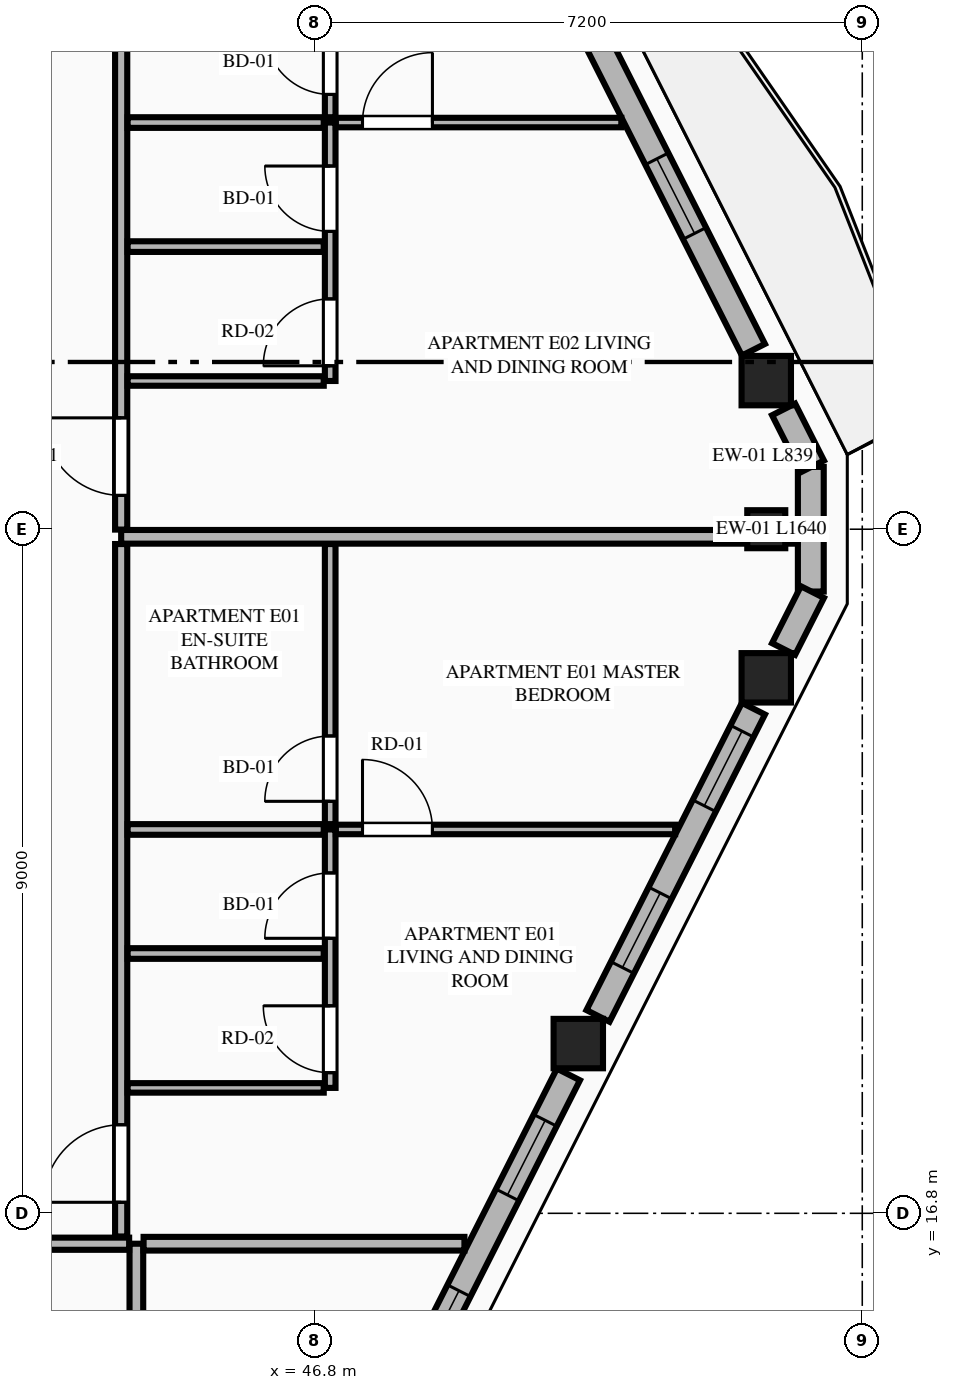
"""IFC4 building model, lengths in metres.
Left out: names, types, materials, properties, quantities, classifications, styles, units other than length and angle.
Written with IfcOpenShell. Run it as: python <this file> out.ifc"""

import sys

from ifc_helpers import new_model, si_unit, direction, frame, frame_2d, origin, origin_2d, place, context, subcontext, project, spatial, rectangle, extrude, element, fill, save


model = new_model("IFC4")
c1 = context("Model", 3, precision=1e-05, world=origin(), true_north=direction((0.0, 1.0)))
c2 = subcontext(c1, "Body", "Model", "MODEL_VIEW")
j1 = project(units=[si_unit("LENGTHUNIT", "METRE"), si_unit("PLANEANGLEUNIT", "RADIAN")], contexts=[c1])
p1 = place(None, origin())
s1 = spatial("IfcSite", under=j1, at=p1, CompositionType="ELEMENT")
p2 = place(p1, origin())
s2 = spatial("IfcBuilding", under=s1, at=p2, CompositionType="ELEMENT")
p3 = place(p2, frame((0.0, 0.0, 287.5)))
s3 = spatial("IfcBuildingStorey", under=s2, at=p3, CompositionType="ELEMENT", Elevation=287.5)
for number, where, z_axis, x_axis in (
    (1, (50.264, 19.033, 0.0), (0.0, 0.0, 1.0), (1.0, 0.0, 0.0)),
    (2, (52.737, 23.845, 0.0), (0.0, 0.0, 1.0), (1.0, 0.0, 0.0)),
    (3, (52.737, 27.755, 0.0), (0.0, 0.0, 1.0), (1.0, 0.0, 0.0)),
):
    element("IfcColumn", number, at=place(p3, frame(where, z_axis=z_axis, x_axis=x_axis)), inside=s3, PredefinedType="COLUMN", context=c2, shape_type="SweptSolid", body=[
        extrude(rectangle(XDim=0.65, YDim=0.65, at=origin_2d()), origin(), (0.0, 0.0, 1.0), 4.0),
    ])
p4 = place(p3, frame((52.737, 25.8, 0.0), z_axis=(0.0, 0.0, 1.0), x_axis=(0.0, 1.0, 0.0)))
e4 = element("IfcColumn", 4, at=p4, inside=s3, PredefinedType="PILASTER", context=c2, shape_type="SweptSolid", body=[
    extrude(rectangle(XDim=0.5, YDim=0.35, at=origin_2d()), origin(), (0.0, 0.0, 1.0), 4.0),
])
p5 = place(p3, frame((53.323, 24.98, 0.0), z_axis=(0.0, 0.0, 1.0), x_axis=(0.0, 1.0, 0.0)))
e5 = element("IfcWall", 5, at=p5, inside=s3, PredefinedType="STANDARD", context=c2, shape_type="SweptSolid", body=[
    extrude(rectangle(XDim=1.64, YDim=0.34, at=frame_2d((0.82, 0.0))), origin(), (0.0, 0.0, 1.0), 3.8),
])
p6 = place(p3, frame((48.002, 14.413, 0.0), z_axis=(0.0, 0.0, 1.0), x_axis=(0.451468341582, 0.892287137949, 0.0)))
e6 = element("IfcWall", 6, at=p6, inside=s3, PredefinedType="STANDARD", context=c2, shape_type="SweptSolid", body=[
    extrude(rectangle(XDim=4.723, YDim=0.34, at=frame_2d((2.361, 0.0))), origin(), (0.0, 0.0, 1.0), 2.99),
])
p7 = place(p6, frame((0.434, 0.0, 0.75)))
e7 = element("IfcOpeningElement", 7, at=p7, cuts=e6, PredefinedType="OPENING", context=c2, shape_type="SweptSolid", body=[
    extrude(rectangle(XDim=1.1, YDim=2.0, at=frame_2d((0.55, 1.0))), frame((0.0, 0.18, 0.0), z_axis=(0.0, -1.0, 0.0), x_axis=(1.0, 0.0, 0.0)), (0.0, 0.0, 1.0), 0.36),
])
p8 = place(p6, frame((2.946, 0.0, 0.75)))
e8 = element("IfcOpeningElement", 8, at=p8, cuts=e6, PredefinedType="OPENING", context=c2, shape_type="SweptSolid", body=[
    extrude(rectangle(XDim=1.1, YDim=2.0, at=frame_2d((0.55, 1.0))), frame((0.0, 0.18, 0.0), z_axis=(0.0, -1.0, 0.0), x_axis=(1.0, 0.0, 0.0)), (0.0, 0.0, 1.0), 0.36),
])
p9 = place(p3, frame((50.523, 19.397, 0.0), z_axis=(0.0, 0.0, 1.0), x_axis=(0.45147697324, 0.892282770558, 0.0)))
e9 = element("IfcWall", 9, at=p9, inside=s3, PredefinedType="STANDARD", context=c2, shape_type="SweptSolid", body=[
    extrude(rectangle(XDim=4.53, YDim=0.34, at=frame_2d((2.265, 0.0))), origin(), (0.0, 0.0, 1.0), 2.99),
])
p10 = place(p9, frame((0.713, 0.0, 0.75)))
e10 = element("IfcOpeningElement", 10, at=p10, cuts=e9, PredefinedType="OPENING", context=c2, shape_type="SweptSolid", body=[
    extrude(rectangle(XDim=1.1, YDim=2.0, at=frame_2d((0.55, 1.0))), frame((0.0, 0.18, 0.0), z_axis=(0.0, -1.0, 0.0), x_axis=(1.0, 0.0, 0.0)), (0.0, 0.0, 1.0), 0.36),
])
p11 = place(p9, frame((3.098, 0.0, 0.75)))
e11 = element("IfcOpeningElement", 11, at=p11, cuts=e9, PredefinedType="OPENING", context=c2, shape_type="SweptSolid", body=[
    extrude(rectangle(XDim=1.1, YDim=2.0, at=frame_2d((0.55, 1.0))), frame((0.0, 0.18, 0.0), z_axis=(0.0, -1.0, 0.0), x_axis=(1.0, 0.0, 0.0)), (0.0, 0.0, 1.0), 0.36),
])
p12 = place(p3, frame((52.965, 24.224, 0.0), z_axis=(0.0, 0.0, 1.0), x_axis=(0.4515140893, 0.892263989615, 0.0)))
e12 = element("IfcWall", 12, at=p12, inside=s3, PredefinedType="STANDARD", context=c2, shape_type="SweptSolid", body=[
    extrude(rectangle(XDim=0.839, YDim=0.34, at=frame_2d((0.419, 0.0))), origin(), (0.0, 0.0, 1.0), 3.8),
])
p13 = place(p3, frame((53.344, 26.627, 0.0), z_axis=(0.0, 0.0, 1.0), x_axis=(-0.45139691133, 0.892323275748, 0.0)))
e13 = element("IfcWall", 13, at=p13, inside=s3, PredefinedType="STANDARD", context=c2, shape_type="SweptSolid", body=[
    extrude(rectangle(XDim=0.839, YDim=0.34, at=frame_2d((0.42, 0.0))), origin(), (0.0, 0.0, 1.0), 3.8),
])
p14 = place(p3, frame((52.568, 28.161, 0.0), z_axis=(0.0, 0.0, 1.0), x_axis=(-0.45147697324, 0.892282770558, 0.0)))
e14 = element("IfcWall", 14, at=p14, inside=s3, PredefinedType="STANDARD", context=c2, shape_type="SweptSolid", body=[
    extrude(rectangle(XDim=4.53, YDim=0.34, at=frame_2d((2.265, 0.0))), origin(), (0.0, 0.0, 1.0), 2.99),
])
p15 = place(p14, frame((1.715, 0.0, 0.75)))
e15 = element("IfcOpeningElement", 15, at=p15, cuts=e14, PredefinedType="OPENING", context=c2, shape_type="SweptSolid", body=[
    extrude(rectangle(XDim=1.1, YDim=2.0, at=frame_2d((0.55, 1.0))), frame((0.0, 0.18, 0.0), z_axis=(0.0, -1.0, 0.0), x_axis=(1.0, 0.0, 0.0)), (0.0, 0.0, 1.0), 0.36),
])
p16 = place(p3, frame((44.45, 8.119, 0.0), z_axis=(0.0, 0.0, 1.0), x_axis=(0.0, 1.0, 0.0)))
e16 = element("IfcWall", 16, at=p16, inside=s3, PredefinedType="PARTITIONING", context=c2, shape_type="SweptSolid", body=[
    extrude(rectangle(XDim=8.281, YDim=0.18, at=frame_2d((4.141, 0.0))), origin(), (0.0, 0.0, 1.0), 3.8),
])
p17 = place(p3, frame((20.445, 16.4, 0.0), z_axis=(0.0, 0.0, 1.0), x_axis=(1.0, 0.0, 0.0)))
e17 = element("IfcWall", 17, at=p17, inside=s3, PredefinedType="PARTITIONING", context=c2, shape_type="SweptSolid", body=[
    extrude(rectangle(XDim=23.91, YDim=0.16, at=frame_2d((11.955, 0.0))), origin(), (0.0, 0.0, 1.0), 3.8),
])
p18 = place(p17, frame((21.705, 0.0, 0.0)))
e18 = element("IfcOpeningElement", 18, at=p18, cuts=e17, PredefinedType="OPENING", context=c2, shape_type="SweptSolid", body=[
    extrude(rectangle(XDim=1.02, YDim=2.25, at=frame_2d((0.51, 1.125))), frame((0.0, 0.09, 0.0), z_axis=(0.0, -1.0, 0.0), x_axis=(1.0, 0.0, 0.0)), (0.0, 0.0, 1.0), 0.18),
])
p19 = place(p3, frame((44.545, 16.4, 0.0), z_axis=(0.0, 0.0, 1.0), x_axis=(1.0, 0.0, 0.0)))
e19 = element("IfcWall", 19, at=p19, inside=s3, PredefinedType="PARTITIONING", context=c2, shape_type="SweptSolid", body=[
    extrude(rectangle(XDim=4.221, YDim=0.18, at=frame_2d((2.111, 0.0))), origin(), (0.0, 0.0, 1.0), 3.8),
])
p20 = place(p3, frame((44.25, 16.495, 0.0), z_axis=(0.0, 0.0, 1.0), x_axis=(0.0, 1.0, 0.0)))
e20 = element("IfcWall", 20, at=p20, inside=s3, PredefinedType="PARTITIONING", context=c2, shape_type="SweptSolid", body=[
    extrude(rectangle(XDim=9.11, YDim=0.16, at=frame_2d((4.555, 0.0))), origin(), (0.0, 0.0, 1.0), 3.487),
])
p21 = place(p20, frame((0.45, 0.0, 0.0)))
e21 = element("IfcOpeningElement", 21, at=p21, cuts=e20, PredefinedType="OPENING", context=c2, shape_type="SweptSolid", body=[
    extrude(rectangle(XDim=1.02, YDim=2.25, at=frame_2d((0.51, 1.125))), frame((0.0, 0.09, 0.0), z_axis=(0.0, -1.0, 0.0), x_axis=(1.0, 0.0, 0.0)), (0.0, 0.0, 1.0), 0.18),
])
p22 = place(p3, frame((44.335, 18.45, 0.0), z_axis=(0.0, 0.0, 1.0), x_axis=(1.0, 0.0, 0.0)))
e22 = element("IfcWall", 22, at=p22, inside=s3, PredefinedType="PARTITIONING", context=c2, shape_type="SweptSolid", body=[
    extrude(rectangle(XDim=2.58, YDim=0.125, at=frame_2d((1.29, 0.0))), origin(), (0.0, 0.0, 1.0), 3.8),
])
p23 = place(p3, frame((47.0, 18.45, 0.0), z_axis=(0.0, 0.0, 1.0), x_axis=(0.0, 1.0, 0.0)))
e23 = element("IfcWall", 23, at=p23, inside=s3, PredefinedType="PLUMBINGWALL", context=c2, shape_type="SweptSolid", body=[
    extrude(rectangle(XDim=3.4, YDim=0.14, at=frame_2d((1.7, 0.0))), origin(), (0.0, 0.0, 1.0), 3.8),
])
p24 = place(p23, frame((0.2, 0.0, 0.0)))
e24 = element("IfcOpeningElement", 24, at=p24, cuts=e23, PredefinedType="OPENING", context=c2, shape_type="SweptSolid", body=[
    extrude(rectangle(XDim=0.88, YDim=2.15, at=frame_2d((0.44, 1.075))), frame((0.0, 0.08, 0.0), z_axis=(0.0, -1.0, 0.0), x_axis=(1.0, 0.0, 0.0)), (0.0, 0.0, 1.0), 0.16),
])
p25 = place(p23, frame((1.968, 0.0, 0.0)))
e25 = element("IfcOpeningElement", 25, at=p25, cuts=e23, PredefinedType="OPENING", context=c2, shape_type="SweptSolid", body=[
    extrude(rectangle(XDim=0.86, YDim=2.1, at=frame_2d((0.43, 1.05))), frame((0.0, 0.08, 0.0), z_axis=(0.0, -1.0, 0.0), x_axis=(1.0, 0.0, 0.0)), (0.0, 0.0, 1.0), 0.16),
])
p26 = place(p3, frame((47.0, 21.92, 0.0), z_axis=(0.0, 0.0, 1.0), x_axis=(0.0, 1.0, 0.0)))
e26 = element("IfcWall", 26, at=p26, inside=s3, PredefinedType="PLUMBINGWALL", context=c2, shape_type="SweptSolid", body=[
    extrude(rectangle(XDim=3.685, YDim=0.14, at=frame_2d((1.843, 0.0))), origin(), (0.0, 0.0, 1.0), 3.8),
])
p27 = place(p26, frame((0.3, 0.0, 0.0)))
e27 = element("IfcOpeningElement", 27, at=p27, cuts=e26, PredefinedType="OPENING", context=c2, shape_type="SweptSolid", body=[
    extrude(rectangle(XDim=0.86, YDim=2.1, at=frame_2d((0.43, 1.05))), frame((0.0, 0.08, 0.0), z_axis=(0.0, -1.0, 0.0), x_axis=(1.0, 0.0, 0.0)), (0.0, 0.0, 1.0), 0.16),
])
p28 = place(p3, frame((44.335, 21.85, 0.0), z_axis=(0.0, 0.0, 1.0), x_axis=(1.0, 0.0, 0.0)))
e28 = element("IfcWall", 28, at=p28, inside=s3, PredefinedType="PLUMBINGWALL", context=c2, shape_type="SweptSolid", body=[
    extrude(rectangle(XDim=2.58, YDim=0.14, at=frame_2d((1.29, 0.0))), origin(), (0.0, 0.0, 1.0), 3.8),
])
p29 = place(p3, frame((47.075, 21.85, 0.0), z_axis=(0.0, 0.0, 1.0), x_axis=(1.0, 0.0, 0.0)))
e29 = element("IfcWall", 29, at=p29, inside=s3, PredefinedType="PARTITIONING", context=c2, shape_type="SweptSolid", body=[
    extrude(rectangle(XDim=4.463, YDim=0.125, at=frame_2d((2.231, 0.0))), origin(), (0.0, 0.0, 1.0), 3.8),
])
p30 = place(p29, frame((0.35, 0.0, 0.0)))
e30 = element("IfcOpeningElement", 30, at=p30, cuts=e29, PredefinedType="OPENING", context=c2, shape_type="SweptSolid", body=[
    extrude(rectangle(XDim=0.92, YDim=2.15, at=frame_2d((0.46, 1.075))), frame((0.0, 0.073, 0.0), z_axis=(0.0, -1.0, 0.0), x_axis=(1.0, 0.0, 0.0)), (0.0, 0.0, 1.0), 0.145),
])
p31 = place(p3, frame((44.335, 20.218, 0.0), z_axis=(0.0, 0.0, 1.0), x_axis=(1.0, 0.0, 0.0)))
e31 = element("IfcWall", 31, at=p31, inside=s3, PredefinedType="PLUMBINGWALL", context=c2, shape_type="SweptSolid", body=[
    extrude(rectangle(XDim=2.58, YDim=0.14, at=frame_2d((1.29, 0.0))), origin(), (0.0, 0.0, 1.0), 3.8),
])
p32 = place(p3, frame((44.25, 25.7, 0.0), z_axis=(0.0, 0.0, 1.0), x_axis=(1.0, 0.0, 0.0)))
e32 = element("IfcWall", 32, at=p32, inside=s3, PredefinedType="PARTITIONING", context=c2, shape_type="SweptSolid", body=[
    extrude(rectangle(XDim=8.898, YDim=0.18, at=frame_2d((4.449, 0.0))), origin(), (0.0, 0.0, 1.0), 3.8),
])
p33 = place(p3, frame((44.25, 25.795, 0.0), z_axis=(0.0, 0.0, 1.0), x_axis=(0.0, 1.0, 0.0)))
e33 = element("IfcWall", 33, at=p33, inside=s3, PredefinedType="PARTITIONING", context=c2, shape_type="SweptSolid", body=[
    extrude(rectangle(XDim=9.11, YDim=0.16, at=frame_2d((4.555, 0.0))), origin(), (0.0, 0.0, 1.0), 3.487),
])
p34 = place(p33, frame((0.45, 0.0, 0.0)))
e34 = element("IfcOpeningElement", 34, at=p34, cuts=e33, PredefinedType="OPENING", context=c2, shape_type="SweptSolid", body=[
    extrude(rectangle(XDim=1.02, YDim=2.25, at=frame_2d((0.51, 1.125))), frame((0.0, 0.09, 0.0), z_axis=(0.0, -1.0, 0.0), x_axis=(1.0, 0.0, 0.0)), (0.0, 0.0, 1.0), 0.18),
])
p35 = place(p3, frame((44.335, 27.75, 0.0), z_axis=(0.0, 0.0, 1.0), x_axis=(1.0, 0.0, 0.0)))
e35 = element("IfcWall", 35, at=p35, inside=s3, PredefinedType="PARTITIONING", context=c2, shape_type="SweptSolid", body=[
    extrude(rectangle(XDim=2.58, YDim=0.125, at=frame_2d((1.29, 0.0))), origin(), (0.0, 0.0, 1.0), 3.257),
])
p36 = place(p3, frame((47.0, 27.75, 0.0), z_axis=(0.0, 0.0, 1.0), x_axis=(0.0, 1.0, 0.0)))
e36 = element("IfcWall", 36, at=p36, inside=s3, PredefinedType="PLUMBINGWALL", context=c2, shape_type="SweptSolid", body=[
    extrude(rectangle(XDim=3.4, YDim=0.14, at=frame_2d((1.7, 0.0))), origin(), (0.0, 0.0, 1.0), 3.8),
])
p37 = place(p36, frame((0.2, 0.0, 0.0)))
e37 = element("IfcOpeningElement", 37, at=p37, cuts=e36, PredefinedType="OPENING", context=c2, shape_type="SweptSolid", body=[
    extrude(rectangle(XDim=0.88, YDim=2.15, at=frame_2d((0.44, 1.075))), frame((0.0, 0.08, 0.0), z_axis=(0.0, -1.0, 0.0), x_axis=(1.0, 0.0, 0.0)), (0.0, 0.0, 1.0), 0.16),
])
p38 = place(p36, frame((1.968, 0.0, 0.0)))
e38 = element("IfcOpeningElement", 38, at=p38, cuts=e36, PredefinedType="OPENING", context=c2, shape_type="SweptSolid", body=[
    extrude(rectangle(XDim=0.86, YDim=2.1, at=frame_2d((0.43, 1.05))), frame((0.0, 0.08, 0.0), z_axis=(0.0, -1.0, 0.0), x_axis=(1.0, 0.0, 0.0)), (0.0, 0.0, 1.0), 0.16),
])
p39 = place(p3, frame((47.0, 31.22, 0.0), z_axis=(0.0, 0.0, 1.0), x_axis=(0.0, 1.0, 0.0)))
e39 = element("IfcWall", 39, at=p39, inside=s3, PredefinedType="PLUMBINGWALL", context=c2, shape_type="SweptSolid", body=[
    extrude(rectangle(XDim=3.685, YDim=0.14, at=frame_2d((1.843, 0.0))), origin(), (0.0, 0.0, 1.0), 3.8),
])
p40 = place(p39, frame((0.3, 0.0, 0.0)))
e40 = element("IfcOpeningElement", 40, at=p40, cuts=e39, PredefinedType="OPENING", context=c2, shape_type="SweptSolid", body=[
    extrude(rectangle(XDim=0.86, YDim=2.1, at=frame_2d((0.43, 1.05))), frame((0.0, 0.08, 0.0), z_axis=(0.0, -1.0, 0.0), x_axis=(1.0, 0.0, 0.0)), (0.0, 0.0, 1.0), 0.16),
])
p41 = place(p3, frame((44.335, 31.15, 0.0), z_axis=(0.0, 0.0, 1.0), x_axis=(1.0, 0.0, 0.0)))
e41 = element("IfcWall", 41, at=p41, inside=s3, PredefinedType="PLUMBINGWALL", context=c2, shape_type="SweptSolid", body=[
    extrude(rectangle(XDim=2.58, YDim=0.14, at=frame_2d((1.29, 0.0))), origin(), (0.0, 0.0, 1.0), 3.8),
])
p42 = place(p3, frame((47.075, 31.15, 0.0), z_axis=(0.0, 0.0, 1.0), x_axis=(1.0, 0.0, 0.0)))
e42 = element("IfcWall", 42, at=p42, inside=s3, PredefinedType="PARTITIONING", context=c2, shape_type="SweptSolid", body=[
    extrude(rectangle(XDim=3.755, YDim=0.125, at=frame_2d((1.877, 0.0))), origin(), (0.0, 0.0, 1.0), 3.8),
])
p43 = place(p42, frame((0.35, 0.0, 0.0)))
e43 = element("IfcOpeningElement", 43, at=p43, cuts=e42, PredefinedType="OPENING", context=c2, shape_type="SweptSolid", body=[
    extrude(rectangle(XDim=0.92, YDim=2.15, at=frame_2d((0.46, 1.075))), frame((0.0, 0.073, 0.0), z_axis=(0.0, -1.0, 0.0), x_axis=(1.0, 0.0, 0.0)), (0.0, 0.0, 1.0), 0.145),
])
p44 = place(p3, frame((44.335, 29.518, 0.0), z_axis=(0.0, 0.0, 1.0), x_axis=(1.0, 0.0, 0.0)))
e44 = element("IfcWall", 44, at=p44, inside=s3, PredefinedType="PLUMBINGWALL", context=c2, shape_type="SweptSolid", body=[
    extrude(rectangle(XDim=2.58, YDim=0.14, at=frame_2d((1.29, 0.0))), origin(), (0.0, 0.0, 1.0), 3.8),
])
p45 = place(p7, origin())
e45 = element("IfcWindow", 45, at=p45, inside=s3, PartitioningType="SINGLE_PANEL", PredefinedType="WINDOW", context=c2, shape_type="SweptSolid", body=[
    extrude(rectangle(XDim=1.1, YDim=2.0, at=frame_2d((0.55, 1.0))), frame((0.0, 0.03, 0.0), z_axis=(0.0, -1.0, 0.0), x_axis=(1.0, 0.0, 0.0)), (0.0, 0.0, 1.0), 0.06),
])
fill(e7, e45)
p46 = place(p10, origin())
e46 = element("IfcWindow", 46, at=p46, inside=s3, PartitioningType="SINGLE_PANEL", PredefinedType="WINDOW", context=c2, shape_type="SweptSolid", body=[
    extrude(rectangle(XDim=1.1, YDim=2.0, at=frame_2d((0.55, 1.0))), frame((0.0, 0.03, 0.0), z_axis=(0.0, -1.0, 0.0), x_axis=(1.0, 0.0, 0.0)), (0.0, 0.0, 1.0), 0.06),
])
fill(e10, e46)
p47 = place(p15, origin())
e47 = element("IfcWindow", 47, at=p47, inside=s3, PartitioningType="SINGLE_PANEL", PredefinedType="WINDOW", context=c2, shape_type="SweptSolid", body=[
    extrude(rectangle(XDim=1.1, YDim=2.0, at=frame_2d((0.55, 1.0))), frame((0.0, 0.03, 0.0), z_axis=(0.0, -1.0, 0.0), x_axis=(1.0, 0.0, 0.0)), (0.0, 0.0, 1.0), 0.06),
])
fill(e15, e47)
p48 = place(p24, origin())
e48 = element("IfcDoor", 48, at=p48, inside=s3, OperationType="SINGLE_SWING_RIGHT", PredefinedType="DOOR", context=c2, shape_type="SweptSolid", body=[
    extrude(rectangle(XDim=0.88, YDim=2.15, at=frame_2d((0.44, 1.075))), frame((0.0, 0.025, 0.0), z_axis=(0.0, -1.0, 0.0), x_axis=(1.0, 0.0, 0.0)), (0.0, 0.0, 1.0), 0.05),
])
fill(e24, e48)
p49 = place(p25, origin())
e49 = element("IfcDoor", 49, at=p49, inside=s3, OperationType="SINGLE_SWING_LEFT", PredefinedType="DOOR", context=c2, shape_type="SweptSolid", body=[
    extrude(rectangle(XDim=0.86, YDim=2.1, at=frame_2d((0.43, 1.05))), frame((0.0, 0.025, 0.0), z_axis=(0.0, -1.0, 0.0), x_axis=(1.0, 0.0, 0.0)), (0.0, 0.0, 1.0), 0.05),
])
fill(e25, e49)
p50 = place(p27, origin())
e50 = element("IfcDoor", 50, at=p50, inside=s3, OperationType="SINGLE_SWING_LEFT", PredefinedType="DOOR", context=c2, shape_type="SweptSolid", body=[
    extrude(rectangle(XDim=0.86, YDim=2.1, at=frame_2d((0.43, 1.05))), frame((0.0, 0.025, 0.0), z_axis=(0.0, -1.0, 0.0), x_axis=(1.0, 0.0, 0.0)), (0.0, 0.0, 1.0), 0.05),
])
fill(e27, e50)
p51 = place(p21, origin())
e51 = element("IfcDoor", 51, at=p51, inside=s3, OperationType="SINGLE_SWING_LEFT", PredefinedType="DOOR", context=c2, shape_type="SweptSolid", body=[
    extrude(rectangle(XDim=1.02, YDim=2.25, at=frame_2d((0.51, 1.125))), frame((0.0, 0.025, 0.0), z_axis=(0.0, -1.0, 0.0), x_axis=(1.0, 0.0, 0.0)), (0.0, 0.0, 1.0), 0.05),
])
fill(e21, e51)
p52 = place(p30, origin())
e52 = element("IfcDoor", 52, at=p52, inside=s3, OperationType="SINGLE_SWING_LEFT", PredefinedType="DOOR", context=c2, shape_type="SweptSolid", body=[
    extrude(rectangle(XDim=0.92, YDim=2.15, at=frame_2d((0.46, 1.075))), frame((0.0, 0.025, 0.0), z_axis=(0.0, -1.0, 0.0), x_axis=(1.0, 0.0, 0.0)), (0.0, 0.0, 1.0), 0.05),
])
fill(e30, e52)
p53 = place(p37, origin())
e53 = element("IfcDoor", 53, at=p53, inside=s3, OperationType="SINGLE_SWING_LEFT", PredefinedType="DOOR", context=c2, shape_type="SweptSolid", body=[
    extrude(rectangle(XDim=0.88, YDim=2.15, at=frame_2d((0.44, 1.075))), frame((0.0, 0.025, 0.0), z_axis=(0.0, -1.0, 0.0), x_axis=(1.0, 0.0, 0.0)), (0.0, 0.0, 1.0), 0.05),
])
fill(e37, e53)
p54 = place(p38, origin())
e54 = element("IfcDoor", 54, at=p54, inside=s3, OperationType="SINGLE_SWING_RIGHT", PredefinedType="DOOR", context=c2, shape_type="SweptSolid", body=[
    extrude(rectangle(XDim=0.86, YDim=2.1, at=frame_2d((0.43, 1.05))), frame((0.0, 0.025, 0.0), z_axis=(0.0, -1.0, 0.0), x_axis=(1.0, 0.0, 0.0)), (0.0, 0.0, 1.0), 0.05),
])
fill(e38, e54)
p55 = place(p40, origin())
e55 = element("IfcDoor", 55, at=p55, inside=s3, OperationType="SINGLE_SWING_RIGHT", PredefinedType="DOOR", context=c2, shape_type="SweptSolid", body=[
    extrude(rectangle(XDim=0.86, YDim=2.1, at=frame_2d((0.43, 1.05))), frame((0.0, 0.025, 0.0), z_axis=(0.0, -1.0, 0.0), x_axis=(1.0, 0.0, 0.0)), (0.0, 0.0, 1.0), 0.05),
])
fill(e40, e55)
p56 = place(p34, origin())
e56 = element("IfcDoor", 56, at=p56, inside=s3, OperationType="SINGLE_SWING_RIGHT", PredefinedType="DOOR", context=c2, shape_type="SweptSolid", body=[
    extrude(rectangle(XDim=1.02, YDim=2.25, at=frame_2d((0.51, 1.125))), frame((0.0, 0.025, 0.0), z_axis=(0.0, -1.0, 0.0), x_axis=(1.0, 0.0, 0.0)), (0.0, 0.0, 1.0), 0.05),
])
fill(e34, e56)
p57 = place(p43, origin())
e57 = element("IfcDoor", 57, at=p57, inside=s3, OperationType="SINGLE_SWING_RIGHT", PredefinedType="DOOR", context=c2, shape_type="SweptSolid", body=[
    extrude(rectangle(XDim=0.92, YDim=2.15, at=frame_2d((0.46, 1.075))), frame((0.0, 0.025, 0.0), z_axis=(0.0, -1.0, 0.0), x_axis=(1.0, 0.0, 0.0)), (0.0, 0.0, 1.0), 0.05),
])
fill(e43, e57)
p58 = place(p8, origin())
e58 = element("IfcWindow", 58, at=p58, inside=s3, PartitioningType="SINGLE_PANEL", PredefinedType="WINDOW", context=c2, shape_type="SweptSolid", body=[
    extrude(rectangle(XDim=1.1, YDim=2.0, at=frame_2d((0.55, 1.0))), frame((0.0, 0.03, 0.0), z_axis=(0.0, -1.0, 0.0), x_axis=(1.0, 0.0, 0.0)), (0.0, 0.0, 1.0), 0.06),
])
fill(e8, e58)
p59 = place(p11, origin())
e59 = element("IfcWindow", 59, at=p59, inside=s3, PartitioningType="SINGLE_PANEL", PredefinedType="WINDOW", context=c2, shape_type="SweptSolid", body=[
    extrude(rectangle(XDim=1.1, YDim=2.0, at=frame_2d((0.55, 1.0))), frame((0.0, 0.03, 0.0), z_axis=(0.0, -1.0, 0.0), x_axis=(1.0, 0.0, 0.0)), (0.0, 0.0, 1.0), 0.06),
])
fill(e11, e59)
save(model, sys.argv[1])
